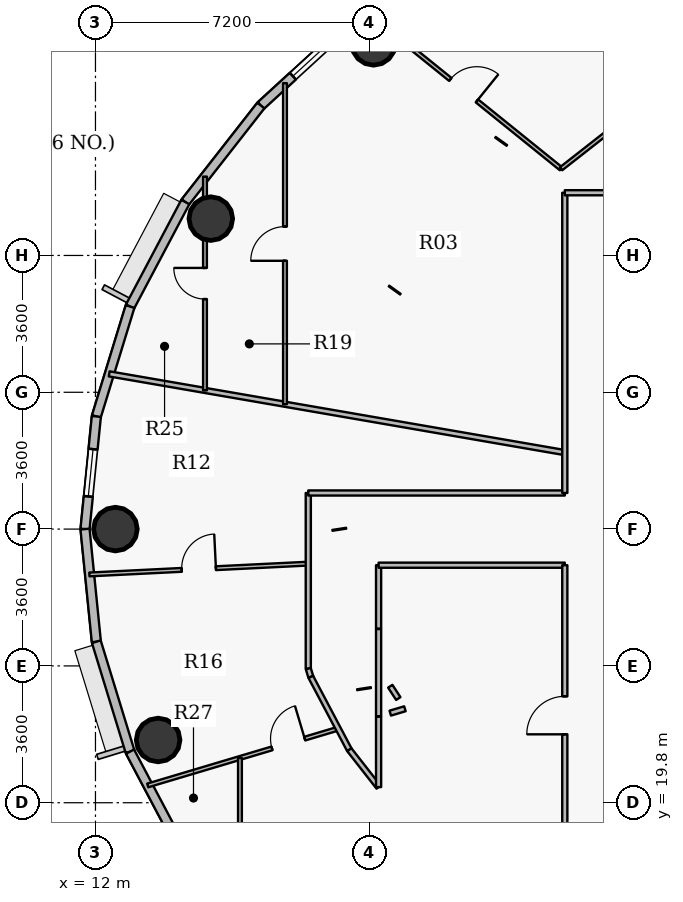
"""IFC4 building model, lengths in metres.
Left out: names, types, materials, properties, quantities, classifications, styles, units other than length and angle.
Written with IfcOpenShell. Run it as: python <this file> out.ifc"""

import sys

from ifc_helpers import new_model, si_unit, direction, frame, frame_2d, origin, origin_2d, place, context, subcontext, project, spatial, rectangle, hollow_circle, extrude, source, transform, mapped, element, fill, save


model = new_model("IFC4")
c1 = context("Model", 3, precision=1e-05, world=origin(), true_north=direction((0.0, 1.0)))
c2 = subcontext(c1, "Body", "Model", "MODEL_VIEW")
j1 = project(units=[si_unit("LENGTHUNIT", "METRE"), si_unit("PLANEANGLEUNIT", "RADIAN")], contexts=[c1])
p1 = place(None, origin())
s1 = spatial("IfcSite", under=j1, at=p1, CompositionType="ELEMENT")
p2 = place(p1, origin())
s2 = spatial("IfcBuilding", under=s1, at=p2, CompositionType="ELEMENT")
p3 = place(p2, frame((0.0, 0.0, 229.05)))
s3 = spatial("IfcBuildingStorey", under=s2, at=p3, CompositionType="ELEMENT", Elevation=229.05)
for number, where, z_axis, x_axis in (
    (1, (19.317, 39.781, 0.0), (0.0, 0.0, 1.0), (1.0, 0.0, 0.0)),
    (2, (15.035, 35.169, 0.0), (0.0, 0.0, 1.0), (1.0, 0.0, 0.0)),
    (3, (12.525, 27.0, 0.0), (0.0, 0.0, 1.0), (1.0, 0.0, 0.0)),
    (4, (13.649, 21.451, 0.0), (0.0, 0.0, 1.0), (1.0, 0.0, 0.0)),
):
    element("IfcColumn", number, at=place(p3, frame(where, z_axis=z_axis, x_axis=x_axis)), inside=s3, PredefinedType="COLUMN", context=c2, shape_type="SweptSolid", body=[
        extrude(hollow_circle(Radius=0.575, WallThickness=0.036, at=origin_2d()), origin(), (0.0, 0.0, 1.0), 3.75),
    ])
p4 = place(p3, frame((16.352, 38.145, 0.0), z_axis=(0.0, 0.0, 1.0), x_axis=(0.737123922599, 0.675757591694, 0.0)))
e5 = element("IfcWall", 5, at=p4, inside=s3, PredefinedType="SOLIDWALL", context=c2, shape_type="SweptSolid", body=[
    extrude(rectangle(XDim=3.354, YDim=0.24, at=frame_2d((1.677, 0.0))), origin(), (0.0, 0.0, 1.0), 3.5),
])
p5 = place(p4, frame((1.144, 0.0, 0.9)))
e6 = element("IfcOpeningElement", 6, at=p5, cuts=e5, PredefinedType="OPENING", context=c2, shape_type="SweptSolid", body=[
    extrude(rectangle(XDim=1.25, YDim=1.65, at=origin_2d()), frame((0.625, 0.13, 0.825), z_axis=(0.0, -1.0, 0.0), x_axis=(1.0, 0.0, 0.0)), (0.0, 0.0, 1.0), 0.26),
])
p6 = place(p3, frame((14.364, 35.605, 0.0), z_axis=(0.0, 0.0, 1.0), x_axis=(0.616312344705, 0.787501805562, 0.0)))
e7 = element("IfcWall", 7, at=p6, inside=s3, PredefinedType="SOLIDWALL", context=c2, shape_type="SweptSolid", body=[
    extrude(rectangle(XDim=3.225, YDim=0.24, at=frame_2d((1.612, 0.0))), origin(), (0.0, 0.0, 1.0), 3.5),
])
p7 = place(p3, frame((12.91, 32.856, 0.0), z_axis=(0.0, 0.0, 1.0), x_axis=(0.46766049993, 0.883908172157, 0.0)))
e8 = element("IfcWall", 8, at=p7, inside=s3, PredefinedType="SOLIDWALL", context=c2, shape_type="SweptSolid", body=[
    extrude(rectangle(XDim=3.11, YDim=0.24, at=frame_2d((1.555, 0.0))), origin(), (0.0, 0.0, 1.0), 3.5),
])
p8 = place(p3, frame((12.023, 29.964, 0.0), z_axis=(0.0, 0.0, 1.0), x_axis=(0.293132907334, 0.95607170162, 0.0)))
e9 = element("IfcWall", 9, at=p8, inside=s3, PredefinedType="SOLIDWALL", context=c2, shape_type="SweptSolid", body=[
    extrude(rectangle(XDim=3.025, YDim=0.24, at=frame_2d((1.512, 0.0))), origin(), (0.0, 0.0, 1.0), 3.5),
])
p9 = place(p3, frame((11.725, 27.0, 0.0), z_axis=(0.0, 0.0, 1.0), x_axis=(0.099990595253, 0.994988382274, 0.0)))
e10 = element("IfcWall", 10, at=p9, inside=s3, PredefinedType="SOLIDWALL", context=c2, shape_type="SweptSolid", body=[
    extrude(rectangle(XDim=2.979, YDim=0.24, at=frame_2d((1.489, 0.0))), origin(), (0.0, 0.0, 1.0), 3.5),
])
p10 = place(p9, frame((0.865, 0.0, 0.9)))
e11 = element("IfcOpeningElement", 11, at=p10, cuts=e10, PredefinedType="OPENING", context=c2, shape_type="SweptSolid", body=[
    extrude(rectangle(XDim=1.25, YDim=1.65, at=origin_2d()), frame((0.625, 0.13, 0.825), z_axis=(0.0, -1.0, 0.0), x_axis=(1.0, 0.0, 0.0)), (0.0, 0.0, 1.0), 0.26),
])
p11 = place(p3, frame((12.023, 24.036, 0.0), z_axis=(0.0, 0.0, 1.0), x_axis=(-0.099990595253, 0.994988382274, 0.0)))
e12 = element("IfcWall", 12, at=p11, inside=s3, PredefinedType="SOLIDWALL", context=c2, shape_type="SweptSolid", body=[
    extrude(rectangle(XDim=2.979, YDim=0.24, at=frame_2d((1.489, 0.0))), origin(), (0.0, 0.0, 1.0), 3.5),
])
p12 = place(p3, frame((12.91, 21.144, 0.0), z_axis=(0.0, 0.0, 1.0), x_axis=(-0.293132907334, 0.95607170162, 0.0)))
e13 = element("IfcWall", 13, at=p12, inside=s3, PredefinedType="SOLIDWALL", context=c2, shape_type="SweptSolid", body=[
    extrude(rectangle(XDim=3.025, YDim=0.24, at=frame_2d((1.512, 0.0))), origin(), (0.0, 0.0, 1.0), 3.5),
])
p13 = place(p3, frame((14.364, 18.395, 0.0), z_axis=(0.0, 0.0, 1.0), x_axis=(-0.46766049993, 0.883908172157, 0.0)))
e14 = element("IfcWall", 14, at=p13, inside=s3, PredefinedType="SOLIDWALL", context=c2, shape_type="SweptSolid", body=[
    extrude(rectangle(XDim=3.11, YDim=0.24, at=frame_2d((1.555, 0.0))), origin(), (0.0, 0.0, 1.0), 3.5),
])
p14 = place(p3, frame((11.84, 25.807, 0.0), z_axis=(0.0, 0.0, 1.0), x_axis=(0.99878109644, 0.049359106487, 0.0)))
e15 = element("IfcWall", 15, at=p14, inside=s3, PredefinedType="PARTITIONING", context=c2, shape_type="SweptSolid", body=[
    extrude(rectangle(XDim=5.767, YDim=0.1, at=frame_2d((2.884, 0.0))), origin(), (0.0, 0.0, 1.0), 2.985),
])
p15 = place(p14, frame((2.434, 0.0, 0.0)))
e16 = element("IfcOpeningElement", 16, at=p15, cuts=e15, PredefinedType="OPENING", context=c2, shape_type="SweptSolid", body=[
    extrude(rectangle(XDim=0.9, YDim=2.1, at=origin_2d()), frame((0.45, 0.06, 1.05), z_axis=(0.0, -1.0, 0.0), x_axis=(1.0, 0.0, 0.0)), (0.0, 0.0, 1.0), 0.12),
])
p16 = place(p3, frame((12.361, 31.084, 0.0), z_axis=(0.0, 0.0, 1.0), x_axis=(0.98539748391, -0.17026978212, 0.0)))
e17 = element("IfcWall", 17, at=p16, inside=s3, PredefinedType="PARTITIONING", context=c2, shape_type="SweptSolid", body=[
    extrude(rectangle(XDim=12.166, YDim=0.135, at=frame_2d((6.083, 0.0))), origin(), (0.0, 0.0, 1.0), 2.985),
])
p17 = place(p3, frame((13.375, 20.255, 0.0), z_axis=(0.0, 0.0, 1.0), x_axis=(0.95831691216, 0.285707360544, 0.0)))
e18 = element("IfcWall", 18, at=p17, inside=s3, PredefinedType="PARTITIONING", context=c2, shape_type="SweptSolid", body=[
    extrude(rectangle(XDim=5.23, YDim=0.1, at=frame_2d((2.615, 0.0))), origin(), (0.0, 0.0, 1.0), 2.985),
])
p18 = place(p17, frame((3.412, 0.0, 0.0)))
e19 = element("IfcOpeningElement", 19, at=p18, cuts=e18, PredefinedType="OPENING", context=c2, shape_type="SweptSolid", body=[
    extrude(rectangle(XDim=0.9, YDim=2.1, at=origin_2d()), frame((0.45, 0.06, 1.05), z_axis=(0.0, -1.0, 0.0), x_axis=(1.0, 0.0, 0.0)), (0.0, 0.0, 1.0), 0.12),
])
p19 = place(p3, frame((14.882, 30.649, 0.0), z_axis=(0.0, 0.0, 1.0), x_axis=(0.0, 1.0, 0.0)))
e20 = element("IfcWall", 20, at=p19, inside=s3, PredefinedType="PARTITIONING", context=c2, shape_type="SweptSolid", body=[
    extrude(rectangle(XDim=5.626, YDim=0.1, at=frame_2d((2.813, 0.0))), origin(), (0.0, 0.0, 1.0), 2.985),
])
p20 = place(p19, frame((2.403, 0.0, 0.0)))
e21 = element("IfcOpeningElement", 21, at=p20, cuts=e20, PredefinedType="OPENING", context=c2, shape_type="SweptSolid", body=[
    extrude(rectangle(XDim=0.82, YDim=2.1, at=origin_2d()), frame((0.41, 0.06, 1.05), z_axis=(0.0, -1.0, 0.0), x_axis=(1.0, 0.0, 0.0)), (0.0, 0.0, 1.0), 0.12),
])
p21 = place(p3, frame((15.802, 16.55, 0.0), z_axis=(0.0, 0.0, 1.0), x_axis=(0.0, 1.0, 0.0)))
e22 = element("IfcWall", 22, at=p21, inside=s3, PredefinedType="PARTITIONING", context=c2, shape_type="SweptSolid", body=[
    extrude(rectangle(XDim=4.429, YDim=0.1, at=frame_2d((2.214, 0.0))), origin(), (0.0, 0.0, 1.0), 2.985),
])
p22 = place(p21, frame((1.804, 0.0, 0.0)))
e23 = element("IfcOpeningElement", 23, at=p22, cuts=e22, PredefinedType="OPENING", context=c2, shape_type="SweptSolid", body=[
    extrude(rectangle(XDim=0.82, YDim=2.1, at=origin_2d()), frame((0.41, 0.06, 1.05), z_axis=(0.0, -1.0, 0.0), x_axis=(1.0, 0.0, 0.0)), (0.0, 0.0, 1.0), 0.12),
])
p23 = place(p3, frame((16.987, 30.285, 0.0), z_axis=(0.0, 0.0, 1.0), x_axis=(0.0, 1.0, 0.0)))
e24 = element("IfcWall", 24, at=p23, inside=s3, PredefinedType="PARTITIONING", context=c2, shape_type="SweptSolid", body=[
    extrude(rectangle(XDim=8.449, YDim=0.1, at=frame_2d((4.224, 0.0))), origin(), (0.0, 0.0, 1.0), 2.935),
])
p24 = place(p23, frame((3.774, 0.0, 0.0)))
e25 = element("IfcOpeningElement", 25, at=p24, cuts=e24, PredefinedType="OPENING", context=c2, shape_type="SweptSolid", body=[
    extrude(rectangle(XDim=0.9, YDim=2.1, at=origin_2d()), frame((0.45, 0.06, 1.05), z_axis=(0.0, -1.0, 0.0), x_axis=(1.0, 0.0, 0.0)), (0.0, 0.0, 1.0), 0.12),
])
p25 = place(p3, frame((17.6, 23.328, 0.0), z_axis=(0.0, 0.0, 1.0), x_axis=(0.0, 1.0, 0.0)))
e26 = element("IfcWall", 26, at=p25, inside=s3, PredefinedType="PARTITIONING", context=c2, shape_type="SweptSolid", body=[
    extrude(rectangle(XDim=4.622, YDim=0.135, at=frame_2d((2.311, 0.0))), origin(), (0.0, 0.0, 1.0), 2.935),
])
p26 = place(p3, frame((17.6, 23.328, 0.0), z_axis=(0.0, 0.0, 1.0), x_axis=(0.292875000845, -0.956150738053, 0.0)))
e27 = element("IfcWall", 27, at=p26, inside=s3, PredefinedType="PARTITIONING", context=c2, shape_type="SweptSolid", body=[
    extrude(rectangle(XDim=0.227, YDim=0.135, at=frame_2d((0.113, 0.0))), origin(), (0.0, 0.0, 1.0), 3.5),
])
p27 = place(p3, frame((17.6, 27.95, 0.0), z_axis=(0.0, 0.0, 1.0), x_axis=(1.0, 0.0, 0.0)))
e28 = element("IfcWall", 28, at=p27, inside=s3, PredefinedType="PARTITIONING", context=c2, shape_type="SweptSolid", body=[
    extrude(rectangle(XDim=6.75, YDim=0.135, at=frame_2d((3.375, 0.0))), origin(), (0.0, 0.0, 1.0), 3.5),
])
p28 = place(p3, frame((17.667, 23.111, 0.0), z_axis=(0.0, 0.0, 1.0), x_axis=(0.467582558239, -0.883949405357, 0.0)))
e29 = element("IfcWall", 29, at=p28, inside=s3, PredefinedType="PARTITIONING", context=c2, shape_type="SweptSolid", body=[
    extrude(rectangle(XDim=2.169, YDim=0.135, at=frame_2d((1.084, 0.0))), origin(), (0.0, 0.0, 1.0), 2.935),
])
p29 = place(p3, frame((18.681, 21.194, 0.0), z_axis=(0.0, 0.0, 1.0), x_axis=(0.616239706802, -0.787558647823, 0.0)))
e30 = element("IfcWall", 30, at=p29, inside=s3, PredefinedType="PARTITIONING", context=c2, shape_type="SweptSolid", body=[
    extrude(rectangle(XDim=1.248, YDim=0.135, at=frame_2d((0.624, 0.0))), origin(), (0.0, 0.0, 1.0), 3.5),
])
p30 = place(p3, frame((19.124, 40.618, 0.0), z_axis=(0.0, 0.0, 1.0), x_axis=(0.778207956818, -0.62800666871, 0.0)))
e31 = element("IfcWall", 31, at=p30, inside=s3, PredefinedType="PARTITIONING", context=c2, shape_type="SweptSolid", body=[
    extrude(rectangle(XDim=6.588, YDim=0.1, at=frame_2d((3.294, 0.0))), origin(), (0.0, 0.0, 1.0), 2.985),
])
p31 = place(p30, frame((2.844, 0.0, 0.0)))
e32 = element("IfcOpeningElement", 32, at=p31, cuts=e31, PredefinedType="OPENING", context=c2, shape_type="SweptSolid", body=[
    extrude(rectangle(XDim=0.9, YDim=2.1, at=origin_2d()), frame((0.45, 0.06, 1.05), z_axis=(0.0, -1.0, 0.0), x_axis=(1.0, 0.0, 0.0)), (0.0, 0.0, 1.0), 0.12),
])
p32 = place(p3, frame((19.45, 20.211, 0.0), z_axis=(0.0, 0.0, 1.0), x_axis=(0.0, 1.0, 0.0)))
e33 = element("IfcWall", 33, at=p32, inside=s3, PredefinedType="PARTITIONING", context=c2, shape_type="SweptSolid", body=[
    extrude(rectangle(XDim=1.855, YDim=0.135, at=frame_2d((0.927, 0.0))), origin(), (0.0, 0.0, 1.0), 3.5),
])
p33 = place(p3, frame((19.45, 24.38, 0.0), z_axis=(0.0, 0.0, 1.0), x_axis=(0.0, 1.0, 0.0)))
e34 = element("IfcWall", 34, at=p33, inside=s3, PredefinedType="PARTITIONING", context=c2, shape_type="SweptSolid", body=[
    extrude(rectangle(XDim=1.67, YDim=0.135, at=frame_2d((0.835, 0.0))), origin(), (0.0, 0.0, 1.0), 3.5),
])
p34 = place(p3, frame((19.45, 26.05, 0.0), z_axis=(0.0, 0.0, 1.0), x_axis=(1.0, 0.0, 0.0)))
e35 = element("IfcWall", 35, at=p34, inside=s3, PredefinedType="PARTITIONING", context=c2, shape_type="SweptSolid", body=[
    extrude(rectangle(XDim=4.9, YDim=0.135, at=frame_2d((2.45, 0.0))), origin(), (0.0, 0.0, 1.0), 3.5),
])
p35 = place(p3, frame((24.251, 36.481, 0.0), z_axis=(0.0, 0.0, 1.0), x_axis=(0.787374491509, 0.616474987426, 0.0)))
e36 = element("IfcWall", 36, at=p35, inside=s3, PredefinedType="PARTITIONING", context=c2, shape_type="SweptSolid", body=[
    extrude(rectangle(XDim=2.171, YDim=0.1, at=frame_2d((1.086, 0.0))), origin(), (0.0, 0.0, 1.0), 3.5),
])
p36 = place(p3, frame((24.35, 18.15, 0.0), z_axis=(0.0, 0.0, 1.0), x_axis=(0.0, 1.0, 0.0)))
e37 = element("IfcWall", 37, at=p36, inside=s3, PredefinedType="PARTITIONING", context=c2, shape_type="SweptSolid", body=[
    extrude(rectangle(XDim=7.9, YDim=0.135, at=frame_2d((3.95, 0.0))), origin(), (0.0, 0.0, 1.0), 2.935),
])
p37 = place(p36, frame((3.45, 0.0, 0.0)))
e38 = element("IfcOpeningElement", 38, at=p37, cuts=e37, PredefinedType="OPENING", context=c2, shape_type="SweptSolid", body=[
    extrude(rectangle(XDim=1.0, YDim=2.15, at=origin_2d()), frame((0.5, 0.078, 1.075), z_axis=(0.0, -1.0, 0.0), x_axis=(1.0, 0.0, 0.0)), (0.0, 0.0, 1.0), 0.155),
])
p38 = place(p3, frame((24.35, 27.95, 0.0), z_axis=(0.0, 0.0, 1.0), x_axis=(0.0, 1.0, 0.0)))
e39 = element("IfcWall", 39, at=p38, inside=s3, PredefinedType="PARTITIONING", context=c2, shape_type="SweptSolid", body=[
    extrude(rectangle(XDim=7.9, YDim=0.135, at=frame_2d((3.95, 0.0))), origin(), (0.0, 0.0, 1.0), 2.935),
])
p39 = place(p3, frame((24.35, 35.85, 0.0), z_axis=(0.0, 0.0, 1.0), x_axis=(1.0, 0.0, 0.0)))
e40 = element("IfcWall", 40, at=p39, inside=s3, PredefinedType="PARTITIONING", context=c2, shape_type="SweptSolid", body=[
    extrude(rectangle(XDim=26.218, YDim=0.135, at=frame_2d((13.109, 0.0))), origin(), (0.0, 0.0, 1.0), 2.935),
])
p40 = place(p39, frame((3.557, 0.0, 0.0)))
e41 = element("IfcOpeningElement", 41, at=p40, cuts=e40, PredefinedType="OPENING", context=c2, shape_type="SweptSolid", body=[
    extrude(rectangle(XDim=1.0, YDim=2.15, at=origin_2d()), frame((0.5, 0.078, 1.075), z_axis=(0.0, -1.0, 0.0), x_axis=(1.0, 0.0, 0.0)), (0.0, 0.0, 1.0), 0.155),
])
p41 = place(p39, frame((22.776, 0.0, 0.0)))
e42 = element("IfcOpeningElement", 42, at=p41, cuts=e40, PredefinedType="OPENING", context=c2, shape_type="SweptSolid", body=[
    extrude(rectangle(XDim=1.0, YDim=2.15, at=origin_2d()), frame((0.5, 0.078, 1.075), z_axis=(0.0, -1.0, 0.0), x_axis=(1.0, 0.0, 0.0)), (0.0, 0.0, 1.0), 0.155),
])
p42 = place(p39, frame((13.736, 0.0, 0.0)))
e43 = element("IfcOpeningElement", 43, at=p42, cuts=e40, PredefinedType="OPENING", context=c2, shape_type="SweptSolid", body=[
    extrude(rectangle(XDim=1.05, YDim=2.15, at=origin_2d()), frame((0.525, 0.078, 1.075), z_axis=(0.0, -1.0, 0.0), x_axis=(1.0, 0.0, 0.0)), (0.0, 0.0, 1.0), 0.155),
])
p43 = place(p39, frame((10.682, 0.0, 0.0)))
e44 = element("IfcOpeningElement", 44, at=p43, cuts=e40, PredefinedType="OPENING", context=c2, shape_type="SweptSolid", body=[
    extrude(rectangle(XDim=1.05, YDim=2.15, at=origin_2d()), frame((0.525, 0.078, 1.075), z_axis=(0.0, -1.0, 0.0), x_axis=(1.0, 0.0, 0.0)), (0.0, 0.0, 1.0), 0.155),
])
p44 = place(p39, frame((8.557, 0.0, 0.0)))
e45 = element("IfcOpeningElement", 45, at=p44, cuts=e40, PredefinedType="OPENING", context=c2, shape_type="SweptSolid", body=[
    extrude(rectangle(XDim=0.82, YDim=2.1, at=origin_2d()), frame((0.41, 0.078, 1.05), z_axis=(0.0, -1.0, 0.0), x_axis=(1.0, 0.0, 0.0)), (0.0, 0.0, 1.0), 0.155),
])
p45 = place(p3, frame((19.45, 24.37, 0.0), z_axis=(0.0, 0.0, 1.0), x_axis=(0.0, -1.0, 0.0)))
e46 = element("IfcWall", 46, at=p45, inside=s3, PredefinedType="PARTITIONING", context=c2, shape_type="SweptSolid", body=[
    extrude(rectangle(XDim=2.294, YDim=0.135, at=frame_2d((1.147, 0.0))), origin(), (0.0, 0.0, 1.0), 2.935),
])
p46 = place(p3, frame((19.758, 22.157, 0.0), z_axis=(0.0, 0.0, 1.0), x_axis=(0.95827609565, 0.285844231191, 0.0)))
e47 = element("IfcWall", 47, at=p46, inside=s3, PredefinedType="PARTITIONING", context=c2, shape_type="SweptSolid", body=[
    extrude(rectangle(XDim=0.402, YDim=0.135, at=frame_2d((0.201, 0.0))), origin(), (0.0, 0.0, 1.0), 3.5),
])
p47 = place(p3, frame((19.968, 22.541, 0.0), z_axis=(0.0, 0.0, 1.0), x_axis=(-0.545477029726, 0.838125772209, 0.0)))
e48 = element("IfcWall", 48, at=p47, inside=s3, PredefinedType="PARTITIONING", context=c2, shape_type="SweptSolid", body=[
    extrude(rectangle(XDim=0.386, YDim=0.135, at=frame_2d((0.193, 0.0))), origin(), (0.0, 0.0, 1.0), 2.935),
])
m1 = source(origin(), c2, "Body", "SweptSolid", [
    extrude(rectangle(XDim=1.25, YDim=1.65, at=origin_2d()), frame((0.625, 0.03, 0.825), z_axis=(0.0, -1.0, 0.0), x_axis=(1.0, 0.0, 0.0)), (0.0, 0.0, 1.0), 0.06),
])
p48 = place(p5, origin())
e49 = element("IfcWindow", 49, at=p48, inside=s3, PartitioningType="SINGLE_PANEL", PredefinedType="WINDOW", context=c2, shape_type="MappedRepresentation", body=[
    mapped(m1, transform((0.0, 0.0, 0.0), x_axis=(1.0, 0.0, 0.0), y_axis=(0.0, 1.0, 0.0), z_axis=(0.0, 0.0, 1.0), scale=1.0)),
])
fill(e6, e49)
p49 = place(p10, origin())
e50 = element("IfcWindow", 50, at=p49, inside=s3, PartitioningType="SINGLE_PANEL", PredefinedType="WINDOW", context=c2, shape_type="MappedRepresentation", body=[
    mapped(m1, transform((0.0, 0.0, 0.0), x_axis=(1.0, 0.0, 0.0), y_axis=(0.0, 1.0, 0.0), z_axis=(0.0, 0.0, 1.0), scale=1.0)),
])
fill(e11, e50)
m2 = source(origin(), c2, "Body", "SweptSolid", [
    extrude(rectangle(XDim=0.9, YDim=2.1, at=origin_2d()), frame((0.45, 0.025, 1.05), z_axis=(0.0, -1.0, 0.0), x_axis=(1.0, 0.0, 0.0)), (0.0, 0.0, 1.0), 0.05),
])
p50 = place(p31, origin())
e51 = element("IfcDoor", 51, at=p50, inside=s3, OperationType="SINGLE_SWING_RIGHT", PredefinedType="DOOR", context=c2, shape_type="MappedRepresentation", body=[
    mapped(m2, transform((0.0, 0.0, 0.0), x_axis=(1.0, 0.0, 0.0), y_axis=(0.0, 1.0, 0.0), z_axis=(0.0, 0.0, 1.0), scale=1.0)),
])
fill(e32, e51)
p51 = place(p24, origin())
e52 = element("IfcDoor", 52, at=p51, inside=s3, OperationType="SINGLE_SWING_LEFT", PredefinedType="DOOR", context=c2, shape_type="MappedRepresentation", body=[
    mapped(m2, transform((0.0, 0.0, 0.0), x_axis=(1.0, 0.0, 0.0), y_axis=(0.0, 1.0, 0.0), z_axis=(0.0, 0.0, 1.0), scale=1.0)),
])
fill(e25, e52)
m3 = source(origin(), c2, "Body", "SweptSolid", [
    extrude(rectangle(XDim=0.82, YDim=2.1, at=origin_2d()), frame((0.41, 0.025, 1.05), z_axis=(0.0, -1.0, 0.0), x_axis=(1.0, 0.0, 0.0)), (0.0, 0.0, 1.0), 0.05),
])
p52 = place(p20, origin())
e53 = element("IfcDoor", 53, at=p52, inside=s3, OperationType="SINGLE_SWING_RIGHT", PredefinedType="DOOR", context=c2, shape_type="MappedRepresentation", body=[
    mapped(m3, transform((0.0, 0.0, 0.0), x_axis=(1.0, 0.0, 0.0), y_axis=(0.0, 1.0, 0.0), z_axis=(0.0, 0.0, 1.0), scale=1.0)),
])
fill(e21, e53)
m4 = source(origin(), c2, "Body", "SweptSolid", [
    extrude(rectangle(XDim=1.0, YDim=2.15, at=origin_2d()), frame((0.5, 0.025, 1.075), z_axis=(0.0, -1.0, 0.0), x_axis=(1.0, 0.0, 0.0)), (0.0, 0.0, 1.0), 0.05),
])
p53 = place(p37, origin())
e54 = element("IfcDoor", 54, at=p53, inside=s3, OperationType="SINGLE_SWING_LEFT", PredefinedType="DOOR", context=c2, shape_type="MappedRepresentation", body=[
    mapped(m4, transform((0.0, 0.0, 0.0), x_axis=(1.0, 0.0, 0.0), y_axis=(0.0, 1.0, 0.0), z_axis=(0.0, 0.0, 1.0), scale=1.0)),
])
fill(e38, e54)
p54 = place(p18, origin())
e55 = element("IfcDoor", 55, at=p54, inside=s3, OperationType="SINGLE_SWING_RIGHT", PredefinedType="DOOR", context=c2, shape_type="MappedRepresentation", body=[
    mapped(m2, transform((0.0, 0.0, 0.0), x_axis=(1.0, 0.0, 0.0), y_axis=(0.0, 1.0, 0.0), z_axis=(0.0, 0.0, 1.0), scale=1.0)),
])
fill(e19, e55)
p55 = place(p15, origin())
e56 = element("IfcDoor", 56, at=p55, inside=s3, OperationType="SINGLE_SWING_RIGHT", PredefinedType="DOOR", context=c2, shape_type="MappedRepresentation", body=[
    mapped(m2, transform((0.0, 0.0, 0.0), x_axis=(1.0, 0.0, 0.0), y_axis=(0.0, 1.0, 0.0), z_axis=(0.0, 0.0, 1.0), scale=1.0)),
])
fill(e16, e56)
save(model, sys.argv[1])
